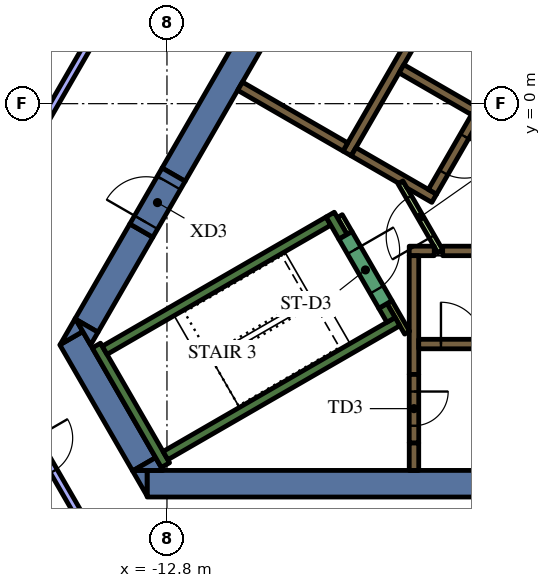
"""IFC4 building model, lengths in metres.
Left out: names, types, materials, properties, quantities, classifications, styles, units other than length and angle.
Written with IfcOpenShell. Run it as: python <this file> out.ifc"""

import sys

from ifc_helpers import new_model, si_unit, direction, frame, frame_2d, origin, place, context, subcontext, project, spatial, polyline, rectangle, outline, extrude, element, fill, save


model = new_model("IFC4")
c1 = context("Model", 3, precision=1e-05, world=origin(), true_north=direction((0.0, 1.0)))
c2 = subcontext(c1, "Body", "Model", "MODEL_VIEW")
j1 = project(units=[si_unit("LENGTHUNIT", "METRE"), si_unit("PLANEANGLEUNIT", "RADIAN")], contexts=[c1])
p1 = place(None, origin())
s1 = spatial("IfcSite", under=j1, at=p1, CompositionType="ELEMENT")
p2 = place(p1, origin())
s2 = spatial("IfcBuilding", under=s1, at=p2, CompositionType="ELEMENT")
p3 = place(p2, frame((0.0, 0.0, 231.0)))
s3 = spatial("IfcBuildingStorey", under=s2, at=p3, CompositionType="ELEMENT", Elevation=231.0)
p4 = place(p3, frame((8.904, -10.0, 0.0), z_axis=(0.0, 0.0, 1.0), x_axis=(-1.0, 0.0, 0.0)))
e1 = element("IfcWall", 1, at=p4, inside=s3, PredefinedType="SOLIDWALL", context=c2, shape_type="SweptSolid", body=[
    extrude(rectangle(XDim=22.226, YDim=0.7, at=frame_2d((11.113, 0.0))), origin(), (0.0, 0.0, 1.0), 4.2),
])
p5 = place(p3, origin())
e2 = element("IfcWall", 2, at=p5, inside=s3, PredefinedType="SOLIDWALL", context=c2, shape_type="SweptSolid", body=[
    extrude(outline(polyline([(-13.712, -9.65), (-13.324, -9.65), (-13.324, -10.322), (-13.712, -9.65)])), origin(), (0.0, 0.0, 1.0), 4.2),
])
p6 = place(p3, frame((-13.402, -9.487, 0.0), z_axis=(0.0, 0.0, 1.0), x_axis=(-0.500020498207, 0.866013568815, 0.0)))
e3 = element("IfcWall", 3, at=p6, inside=s3, PredefinedType="SOLIDWALL", context=c2, shape_type="SweptSolid", body=[
    extrude(rectangle(XDim=3.829, YDim=0.7, at=frame_2d((1.915, 0.0))), origin(), (0.0, 0.0, 1.0), 4.2),
])
e4 = element("IfcWall", 4, at=p5, inside=s3, PredefinedType="SOLIDWALL", context=c2, shape_type="SweptSolid", body=[
    extrude(outline(polyline([(-15.014, -5.995), (-15.611, -6.339), (-15.213, -5.65), (-15.014, -5.995)])), origin(), (0.0, 0.0, 1.0), 4.2),
])
e5 = element("IfcWall", 5, at=p5, inside=s3, PredefinedType="SOLIDWALL", context=c2, shape_type="SweptSolid", body=[
    extrude(outline(polyline([(-12.904, -9.65), (-13.68, -9.65), (-13.098, -9.314), (-12.904, -9.65)])), origin(), (0.0, 0.0, 1.0), 4.2),
])
p7 = place(p3, frame((-13.475, -3.339, 0.0), z_axis=(0.0, 0.0, 1.0), x_axis=(-0.499944726303, -0.866057313716, 0.0)))
e6 = element("IfcWall", 6, at=p7, inside=s3, PredefinedType="SOLIDWALL", context=c2, shape_type="SweptSolid", body=[
    extrude(rectangle(XDim=2.884, YDim=0.7, at=frame_2d((1.442, 0.0))), origin(), (0.0, 0.0, 1.0), 4.2),
])
e7 = element("IfcWall", 7, at=p5, inside=s3, PredefinedType="SOLIDWALL", context=c2, shape_type="SweptSolid", body=[
    extrude(outline(polyline([(-14.809, -6.35), (-15.197, -5.678), (-14.615, -6.014), (-14.809, -6.35)])), origin(), (0.0, 0.0, 1.0), 4.2),
])
p8 = place(p3, frame((-12.625, -1.867, 0.0), z_axis=(0.0, 0.0, 1.0), x_axis=(0.500008520515, 0.866020484407, 0.0)))
e8 = element("IfcWall", 8, at=p8, inside=s3, PredefinedType="SOLIDWALL", context=c2, shape_type="SweptSolid", body=[
    extrude(rectangle(XDim=15.859, YDim=0.7, at=frame_2d((7.929, 0.0))), origin(), (0.0, 0.0, 1.0), 4.2),
])
p9 = place(p3, frame((-12.84, -9.511, 0.0), z_axis=(0.0, 0.0, 1.0), x_axis=(-0.499997733992, 0.866026712061, 0.0)))
e9 = element("IfcWall", 9, at=p9, inside=s3, PredefinedType="SOLIDWALL", context=c2, shape_type="SweptSolid", body=[
    extrude(rectangle(XDim=3.634, YDim=0.25, at=frame_2d((1.817, 0.0))), origin(), (0.0, 0.0, 1.0), 4.2),
])
p10 = place(p3, frame((-14.44, -6.49, 0.0), z_axis=(0.0, 0.0, 1.0), x_axis=(0.866022966069, 0.500004222222, 0.0)))
e10 = element("IfcWall", 10, at=p10, inside=s3, PredefinedType="SOLIDWALL", context=c2, shape_type="SweptSolid", body=[
    extrude(rectangle(XDim=6.8, YDim=0.25, at=frame_2d((3.4, 0.0))), origin(), (0.0, 0.0, 1.0), 4.2),
])
p11 = place(p3, frame((-8.168, -3.503, 0.0), z_axis=(0.0, 0.0, 1.0), x_axis=(-0.499952099219, 0.866053057547, 0.0)))
e11 = element("IfcWall", 11, at=p11, inside=s3, PredefinedType="SOLIDWALL", context=c2, shape_type="SweptSolid", body=[
    extrude(rectangle(XDim=0.675, YDim=0.25, at=frame_2d((0.337, 0.0))), origin(), (0.0, 0.0, 1.0), 4.2),
])
p12 = place(p3, frame((-12.84, -9.261, 0.0), z_axis=(0.0, 0.0, 1.0), x_axis=(0.866016039709, 0.500016218704, 0.0)))
e12 = element("IfcWall", 12, at=p12, inside=s3, PredefinedType="SOLIDWALL", context=c2, shape_type="SweptSolid", body=[
    extrude(rectangle(XDim=7.05, YDim=0.25, at=frame_2d((3.525, 0.0))), origin(), (0.0, 0.0, 1.0), 4.2),
])
p13 = place(p3, frame((-6.905, -5.69, 0.0), z_axis=(0.0, 0.0, 1.0), x_axis=(-0.500402024738, 0.865793170242, 0.0)))
e13 = element("IfcWall", 13, at=p13, inside=s3, PredefinedType="SOLIDWALL", context=c2, shape_type="SweptSolid", body=[
    extrude(rectangle(XDim=0.425, YDim=0.25, at=frame_2d((0.212, 0.0))), origin(), (0.0, 0.0, 1.0), 4.2),
])
p14 = place(p3, frame((-6.3, -8.925, 0.0), z_axis=(0.0, 0.0, 1.0), x_axis=(0.0, -1.0, 0.0)))
e14 = element("IfcWall", 14, at=p14, inside=s3, PredefinedType="SOLIDWALL", context=c2, shape_type="SweptSolid", body=[
    extrude(rectangle(XDim=0.725, YDim=0.25, at=frame_2d((0.363, 0.0))), origin(), (0.0, 0.0, 1.0), 4.2),
])
p15 = place(p3, frame((-5.545, -3.875, 0.0), z_axis=(0.0, 0.0, 1.0), x_axis=(1.0, 0.0, 0.0)))
e15 = element("IfcWall", 15, at=p15, inside=s3, PredefinedType="SOLIDWALL", context=c2, shape_type="SweptSolid", body=[
    extrude(rectangle(XDim=11.97, YDim=0.25, at=frame_2d((5.985, 0.0))), origin(), (0.0, 0.0, 1.0), 4.2),
])
p16 = place(p3, frame((-6.425, -3.875, 0.0), z_axis=(0.0, 0.0, 1.0), x_axis=(1.0, 0.0, 0.0)))
e16 = element("IfcWall", 16, at=p16, inside=s3, PredefinedType="SOLIDWALL", context=c2, shape_type="SweptSolid", body=[
    extrude(rectangle(XDim=0.658, YDim=0.25, at=frame_2d((0.329, 0.0))), origin(), (0.0, 0.0, 1.0), 4.2),
])
p17 = place(p3, frame((-6.3, -7.125, 0.0), z_axis=(0.0, 0.0, 1.0), x_axis=(0.0, 1.0, 0.0)))
e17 = element("IfcWall", 17, at=p17, inside=s3, PredefinedType="SOLIDWALL", context=c2, shape_type="SweptSolid", body=[
    extrude(rectangle(XDim=3.125, YDim=0.25, at=frame_2d((1.562, 0.0))), origin(), (0.0, 0.0, 1.0), 4.2),
])
p18 = place(p3, frame((-8.06, -1.311, 0.0), z_axis=(0.0, 0.0, 1.0), x_axis=(0.50000273126, 0.866023826885, 0.0)))
e18 = element("IfcWall", 18, at=p18, inside=s3, PredefinedType="SOLIDWALL", context=c2, shape_type="SweptSolid", body=[
    extrude(rectangle(XDim=10.33, YDim=0.25, at=frame_2d((5.165, 0.0))), origin(), (0.0, 0.0, 1.0), 4.2),
])
p19 = place(p3, frame((-4.724, -0.182, 0.0), z_axis=(0.0, 0.0, 1.0), x_axis=(-0.866008176907, 0.50002983664, 0.0)))
e19 = element("IfcWall", 19, at=p19, inside=s3, PredefinedType="SOLIDWALL", context=c2, shape_type="SweptSolid", body=[
    extrude(rectangle(XDim=2.2, YDim=0.25, at=frame_2d((1.1, 0.0))), origin(), (0.0, 0.0, 1.0), 4.2),
])
e20 = element("IfcWall", 20, at=p5, inside=s3, PredefinedType="SOLIDWALL", context=c2, shape_type="SweptSolid", body=[
    extrude(outline(polyline([(-5.922, -2.257), (-5.922, -2.257), (-5.705, -2.382), (-5.83, -2.598), (-6.483, -2.221), (-6.591, -2.033), (-6.591, -2.033), (-6.7, -2.096), (-7.952, -1.373), (-7.827, -1.156), (-5.922, -2.257)])), origin(), (0.0, 0.0, 1.0), 4.2),
])
p20 = place(p3, frame((-8.106, -1.14, 0.0), z_axis=(0.0, 0.0, 1.0), x_axis=(-0.866008981251, 0.500028443584, 0.0)))
e21 = element("IfcWall", 21, at=p20, inside=s3, PredefinedType="SOLIDWALL", context=c2, shape_type="SweptSolid", body=[
    extrude(rectangle(XDim=3.2, YDim=0.25, at=frame_2d((1.6, 0.0))), origin(), (0.0, 0.0, 1.0), 4.2),
])
p21 = place(p3, frame((-8.252, -2.958, 0.0), z_axis=(0.0, 0.0, 1.0), x_axis=(0.500174715838, -0.865924508047, 0.0)))
e22 = element("IfcWall", 22, at=p21, inside=s3, PredefinedType="PARTITIONING", context=c2, shape_type="SweptSolid", body=[
    extrude(rectangle(XDim=0.514, YDim=0.15, at=frame_2d((0.257, 0.0))), origin(), (0.0, 0.0, 1.0), 3.45),
])
p22 = place(p3, frame((-6.48, -6.027, 0.0), z_axis=(0.0, 0.0, 1.0), x_axis=(-0.499927229454, 0.866067413802, 0.0)))
e23 = element("IfcWall", 23, at=p22, inside=s3, PredefinedType="PARTITIONING", context=c2, shape_type="SweptSolid", body=[
    extrude(rectangle(XDim=0.929, YDim=0.15, at=frame_2d((0.464, 0.0))), origin(), (0.0, 0.0, 1.0), 4.2),
])
p23 = place(p3, frame((-6.175, -6.325, 0.0), z_axis=(0.0, 0.0, 1.0), x_axis=(1.0, 0.0, 0.0)))
e24 = element("IfcWall", 24, at=p23, inside=s3, PredefinedType="SOLIDWALL", context=c2, shape_type="SweptSolid", body=[
    extrude(rectangle(XDim=12.35, YDim=0.25, at=frame_2d((6.175, 0.0))), origin(), (0.0, 0.0, 1.0), 4.2),
])
p24 = place(p23, frame((0.585, 0.0, 0.0)))
e25 = element("IfcOpeningElement", 25, at=p24, cuts=e24, PredefinedType="OPENING", context=c2, shape_type="SweptSolid", body=[
    extrude(rectangle(XDim=1.1, YDim=2.1, at=frame_2d((0.55, 1.05))), frame((0.0, 0.135, 0.0), z_axis=(0.0, -1.0, 0.0), x_axis=(1.0, 0.0, 0.0)), (0.0, 0.0, 1.0), 0.27),
])
p25 = place(p23, frame((3.105, 0.0, 0.0)))
e26 = element("IfcOpeningElement", 26, at=p25, cuts=e24, PredefinedType="OPENING", context=c2, shape_type="SweptSolid", body=[
    extrude(rectangle(XDim=1.1, YDim=2.1, at=frame_2d((0.55, 1.05))), frame((0.0, 0.135, 0.0), z_axis=(0.0, -1.0, 0.0), x_axis=(1.0, 0.0, 0.0)), (0.0, 0.0, 1.0), 0.27),
])
p26 = place(p23, frame((5.625, 0.0, 0.0)))
e27 = element("IfcOpeningElement", 27, at=p26, cuts=e24, PredefinedType="OPENING", context=c2, shape_type="SweptSolid", body=[
    extrude(rectangle(XDim=1.1, YDim=2.1, at=frame_2d((0.55, 1.05))), frame((0.0, 0.135, 0.0), z_axis=(0.0, -1.0, 0.0), x_axis=(1.0, 0.0, 0.0)), (0.0, 0.0, 1.0), 0.27),
])
p27 = place(p23, frame((8.145, 0.0, 0.0)))
e28 = element("IfcOpeningElement", 28, at=p27, cuts=e24, PredefinedType="OPENING", context=c2, shape_type="SweptSolid", body=[
    extrude(rectangle(XDim=1.1, YDim=2.1, at=frame_2d((0.55, 1.05))), frame((0.0, 0.135, 0.0), z_axis=(0.0, -1.0, 0.0), x_axis=(1.0, 0.0, 0.0)), (0.0, 0.0, 1.0), 0.27),
])
p28 = place(p23, frame((10.665, 0.0, 0.0)))
e29 = element("IfcOpeningElement", 29, at=p28, cuts=e24, PredefinedType="OPENING", context=c2, shape_type="SweptSolid", body=[
    extrude(rectangle(XDim=1.1, YDim=2.1, at=frame_2d((0.55, 1.05))), frame((0.0, 0.135, 0.0), z_axis=(0.0, -1.0, 0.0), x_axis=(1.0, 0.0, 0.0)), (0.0, 0.0, 1.0), 0.27),
])
p29 = place(p3, frame((-0.898, 6.194, 0.0), z_axis=(0.0, 0.0, 1.0), x_axis=(-0.499996202215, -0.866027596426, 0.0)))
e30 = element("IfcWall", 30, at=p29, inside=s3, PredefinedType="SOLIDWALL", context=c2, shape_type="SweptSolid", body=[
    extrude(rectangle(XDim=9.83, YDim=0.25, at=frame_2d((4.915, 0.0))), origin(), (0.0, 0.0, 1.0), 4.2),
])
p30 = place(p29, frame((0.585, 0.0, 0.0)))
e31 = element("IfcOpeningElement", 31, at=p30, cuts=e30, PredefinedType="OPENING", context=c2, shape_type="SweptSolid", body=[
    extrude(rectangle(XDim=1.1, YDim=2.1, at=frame_2d((0.55, 1.05))), frame((0.0, 0.135, 0.0), z_axis=(0.0, -1.0, 0.0), x_axis=(1.0, 0.0, 0.0)), (0.0, 0.0, 1.0), 0.27),
])
p31 = place(p29, frame((3.105, 0.0, 0.0)))
e32 = element("IfcOpeningElement", 32, at=p31, cuts=e30, PredefinedType="OPENING", context=c2, shape_type="SweptSolid", body=[
    extrude(rectangle(XDim=1.1, YDim=2.1, at=frame_2d((0.55, 1.05))), frame((0.0, 0.135, 0.0), z_axis=(0.0, -1.0, 0.0), x_axis=(1.0, 0.0, 0.0)), (0.0, 0.0, 1.0), 0.27),
])
p32 = place(p29, frame((5.625, 0.0, 0.0)))
e33 = element("IfcOpeningElement", 33, at=p32, cuts=e30, PredefinedType="OPENING", context=c2, shape_type="SweptSolid", body=[
    extrude(rectangle(XDim=1.1, YDim=2.1, at=frame_2d((0.55, 1.05))), frame((0.0, 0.135, 0.0), z_axis=(0.0, -1.0, 0.0), x_axis=(1.0, 0.0, 0.0)), (0.0, 0.0, 1.0), 0.27),
])
p33 = place(p29, frame((8.145, 0.0, 0.0)))
e34 = element("IfcOpeningElement", 34, at=p33, cuts=e30, PredefinedType="OPENING", context=c2, shape_type="SweptSolid", body=[
    extrude(rectangle(XDim=1.1, YDim=2.1, at=frame_2d((0.55, 1.05))), frame((0.0, 0.135, 0.0), z_axis=(0.0, -1.0, 0.0), x_axis=(1.0, 0.0, 0.0)), (0.0, 0.0, 1.0), 0.27),
])
p34 = place(p3, frame((-8.103, -3.466, 0.0), z_axis=(0.0, 0.0, 1.0), x_axis=(0.500078061341, -0.865980330357, 0.0)))
e35 = element("IfcWall", 35, at=p34, inside=s3, PredefinedType="SOLIDWALL", context=c2, shape_type="SweptSolid", body=[
    extrude(rectangle(XDim=2.1, YDim=0.4, at=frame_2d((1.05, 0.0))), origin(), (0.0, 0.0, 1.0), 4.2),
])
p35 = place(p34, frame((0.45, 0.0, 0.0)))
e36 = element("IfcOpeningElement", 36, at=p35, cuts=e35, PredefinedType="OPENING", context=c2, shape_type="SweptSolid", body=[
    extrude(rectangle(XDim=1.2, YDim=2.1, at=frame_2d((0.6, 1.05))), frame((0.0, 0.21, 0.0), z_axis=(0.0, -1.0, 0.0), x_axis=(1.0, 0.0, 0.0)), (0.0, 0.0, 1.0), 0.42),
])
p36 = place(p3, frame((-6.3, -7.125, 0.0), z_axis=(0.0, 0.0, 1.0), x_axis=(0.0, -1.0, 0.0)))
e37 = element("IfcWall", 37, at=p36, inside=s3, PredefinedType="SOLIDWALL", context=c2, shape_type="SweptSolid", body=[
    extrude(rectangle(XDim=1.8, YDim=0.25, at=frame_2d((0.9, 0.0))), origin(), (0.0, 0.0, 1.0), 4.2),
])
p37 = place(p36, frame((0.45, 0.0, 0.0)))
e38 = element("IfcOpeningElement", 38, at=p37, cuts=e37, PredefinedType="OPENING", context=c2, shape_type="SweptSolid", body=[
    extrude(rectangle(XDim=0.9, YDim=2.1, at=frame_2d((0.45, 1.05))), frame((0.0, 0.135, 0.0), z_axis=(0.0, -1.0, 0.0), x_axis=(1.0, 0.0, 0.0)), (0.0, 0.0, 1.0), 0.27),
])
p38 = place(p3, frame((-5.606, -3.89, 0.0), z_axis=(0.0, 0.0, 1.0), x_axis=(-0.500027713859, 0.866009402589, 0.0)))
e39 = element("IfcWall", 39, at=p38, inside=s3, PredefinedType="PARTITIONING", context=c2, shape_type="SweptSolid", body=[
    extrude(rectangle(XDim=2.1, YDim=0.15, at=frame_2d((1.05, 0.0))), origin(), (0.0, 0.0, 1.0), 3.45),
])
p39 = place(p38, frame((0.45, 0.0, 0.0)))
e40 = element("IfcOpeningElement", 40, at=p39, cuts=e39, PredefinedType="OPENING", context=c2, shape_type="SweptSolid", body=[
    extrude(rectangle(XDim=1.2, YDim=2.1, at=frame_2d((0.6, 1.05))), frame((0.0, 0.085, 0.0), z_axis=(0.0, -1.0, 0.0), x_axis=(1.0, 0.0, 0.0)), (0.0, 0.0, 1.0), 0.17),
])
p40 = place(p3, frame((-13.475, -3.339, 0.0), z_axis=(0.0, 0.0, 1.0), x_axis=(0.499954529098, 0.86605165483, 0.0)))
e41 = element("IfcWall", 41, at=p40, inside=s3, PredefinedType="SOLIDWALL", context=c2, shape_type="SweptSolid", body=[
    extrude(rectangle(XDim=1.7, YDim=0.7, at=frame_2d((0.85, 0.0))), origin(), (0.0, 0.0, 1.0), 4.2),
])
p41 = place(p40, frame((0.25, 0.0, 0.0)))
e42 = element("IfcOpeningElement", 42, at=p41, cuts=e41, PredefinedType="OPENING", context=c2, shape_type="SweptSolid", body=[
    extrude(rectangle(XDim=1.2, YDim=2.1, at=frame_2d((0.6, 1.05))), frame((0.0, 0.36, 0.0), z_axis=(0.0, -1.0, 0.0), x_axis=(1.0, 0.0, 0.0)), (0.0, 0.0, 1.0), 0.72),
])
p42 = place(p3, frame((-11.871, 6.738, 0.0), z_axis=(0.0, 0.0, 1.0), x_axis=(-0.500019350398, -0.866014231539, 0.0)))
e43 = element("IfcWall", 43, at=p42, inside=s3, PredefinedType="PARTITIONING", context=c2, shape_type="SweptSolid", body=[
    extrude(rectangle(XDim=9.42, YDim=0.2, at=frame_2d((4.71, 0.0))), origin(), (0.0, 0.0, 1.0), 3.45),
])
p43 = place(p42, frame((4.2, 0.0, 0.0)))
e44 = element("IfcOpeningElement", 44, at=p43, cuts=e43, PredefinedType="OPENING", context=c2, shape_type="SweptSolid", body=[
    extrude(rectangle(XDim=1.0, YDim=2.1, at=frame_2d((0.5, 1.05))), frame((0.0, 0.11, 0.0), z_axis=(0.0, -1.0, 0.0), x_axis=(1.0, 0.0, 0.0)), (0.0, 0.0, 1.0), 0.22),
])
p44 = place(p3, frame((-17.531, -6.635, 0.0), z_axis=(0.0, 0.0, 1.0), x_axis=(0.500009459589, -0.866019942219, 0.0)))
e45 = element("IfcWall", 45, at=p44, inside=s3, PredefinedType="PARTITIONING", context=c2, shape_type="SweptSolid", body=[
    extrude(rectangle(XDim=6.038, YDim=0.2, at=frame_2d((3.019, 0.0))), origin(), (0.0, 0.0, 1.0), 3.45),
])
p45 = place(p44, frame((2.5, 0.0, 0.0)))
e46 = element("IfcOpeningElement", 46, at=p45, cuts=e45, PredefinedType="OPENING", context=c2, shape_type="SweptSolid", body=[
    extrude(rectangle(XDim=1.0, YDim=2.1, at=frame_2d((0.5, 1.05))), frame((0.0, 0.11, 0.0), z_axis=(0.0, -1.0, 0.0), x_axis=(1.0, 0.0, 0.0)), (0.0, 0.0, 1.0), 0.22),
])
p46 = place(p24, origin())
e47 = element("IfcDoor", 47, at=p46, inside=s3, OperationType="DOUBLE_DOOR_SLIDING", PredefinedType="DOOR", context=c2, shape_type="SweptSolid", body=[
    extrude(rectangle(XDim=1.1, YDim=2.1, at=frame_2d((0.55, 1.05))), frame((0.0, 0.025, 0.0), z_axis=(0.0, -1.0, 0.0), x_axis=(1.0, 0.0, 0.0)), (0.0, 0.0, 1.0), 0.05),
])
fill(e25, e47)
p47 = place(p33, origin())
e48 = element("IfcDoor", 48, at=p47, inside=s3, OperationType="DOUBLE_DOOR_SLIDING", PredefinedType="DOOR", context=c2, shape_type="SweptSolid", body=[
    extrude(rectangle(XDim=1.1, YDim=2.1, at=frame_2d((0.55, 1.05))), frame((0.0, 0.025, 0.0), z_axis=(0.0, -1.0, 0.0), x_axis=(1.0, 0.0, 0.0)), (0.0, 0.0, 1.0), 0.05),
])
fill(e34, e48)
p48 = place(p35, origin())
e49 = element("IfcDoor", 49, at=p48, inside=s3, OperationType="SINGLE_SWING_LEFT", PredefinedType="DOOR", context=c2, shape_type="SweptSolid", body=[
    extrude(rectangle(XDim=1.2, YDim=2.1, at=frame_2d((0.6, 1.05))), frame((0.0, 0.025, 0.0), z_axis=(0.0, -1.0, 0.0), x_axis=(1.0, 0.0, 0.0)), (0.0, 0.0, 1.0), 0.05),
])
fill(e36, e49)
p49 = place(p37, origin())
e50 = element("IfcDoor", 50, at=p49, inside=s3, OperationType="SINGLE_SWING_LEFT", PredefinedType="DOOR", context=c2, shape_type="SweptSolid", body=[
    extrude(rectangle(XDim=0.9, YDim=2.1, at=frame_2d((0.45, 1.05))), frame((0.0, 0.025, 0.0), z_axis=(0.0, -1.0, 0.0), x_axis=(1.0, 0.0, 0.0)), (0.0, 0.0, 1.0), 0.05),
])
fill(e38, e50)
p50 = place(p39, origin())
e51 = element("IfcDoor", 51, at=p50, inside=s3, OperationType="SINGLE_SWING_LEFT", PredefinedType="DOOR", context=c2, shape_type="SweptSolid", body=[
    extrude(rectangle(XDim=1.2, YDim=2.1, at=frame_2d((0.6, 1.05))), frame((0.0, 0.025, 0.0), z_axis=(0.0, -1.0, 0.0), x_axis=(1.0, 0.0, 0.0)), (0.0, 0.0, 1.0), 0.05),
])
fill(e40, e51)
p51 = place(p41, origin())
e52 = element("IfcDoor", 52, at=p51, inside=s3, OperationType="SINGLE_SWING_LEFT", PredefinedType="DOOR", context=c2, shape_type="SweptSolid", body=[
    extrude(rectangle(XDim=1.2, YDim=2.1, at=frame_2d((0.6, 1.05))), frame((0.0, 0.025, 0.0), z_axis=(0.0, -1.0, 0.0), x_axis=(1.0, 0.0, 0.0)), (0.0, 0.0, 1.0), 0.05),
])
fill(e42, e52)
p52 = place(p45, origin())
e53 = element("IfcDoor", 53, at=p52, inside=s3, OperationType="SINGLE_SWING_LEFT", PredefinedType="DOOR", context=c2, shape_type="SweptSolid", body=[
    extrude(rectangle(XDim=1.0, YDim=2.1, at=frame_2d((0.5, 1.05))), frame((0.0, 0.025, 0.0), z_axis=(0.0, -1.0, 0.0), x_axis=(1.0, 0.0, 0.0)), (0.0, 0.0, 1.0), 0.05),
])
fill(e46, e53)
save(model, sys.argv[1])
